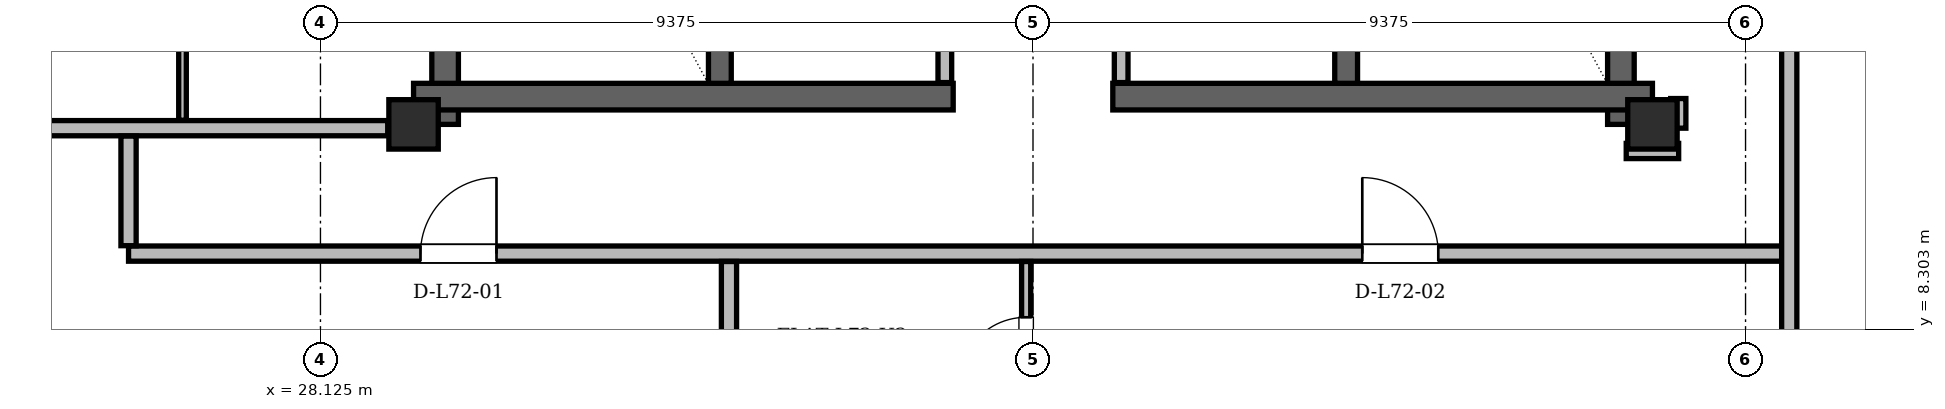
"""IFC4 building model, lengths in metres.
Left out: names, types, materials, properties, quantities, classifications, styles, units other than length and angle.
Written with IfcOpenShell. Run it as: python <this file> out.ifc"""

import sys

from ifc_helpers import new_model, si_unit, direction, frame, frame_2d, origin, origin_2d, place, context, subcontext, project, spatial, rectangle, hollow_rectangle, extrude, element, fill, save


model = new_model("IFC4")
c1 = context("Model", 3, precision=1e-05, world=origin(), true_north=direction((0.0, 1.0)))
c2 = subcontext(c1, "Body", "Model", "MODEL_VIEW")
j1 = project(units=[si_unit("LENGTHUNIT", "METRE"), si_unit("PLANEANGLEUNIT", "RADIAN")], contexts=[c1])
p1 = place(None, origin())
s1 = spatial("IfcSite", under=j1, at=p1, CompositionType="ELEMENT")
p2 = place(p1, origin())
s2 = spatial("IfcBuilding", under=s1, at=p2, CompositionType="ELEMENT")
p3 = place(p2, frame((0.0, 0.0, 273.3)))
s3 = spatial("IfcBuildingStorey", under=s2, at=p3, CompositionType="ELEMENT", Elevation=273.3)
for number, where, z_axis, x_axis in (
    (1, (29.35, 11.0, 0.0), (0.0, 0.0, 1.0), (1.0, 0.0, 0.0)),
    (2, (45.65, 11.0, 0.0), (0.0, 0.0, 1.0), (1.0, 0.0, 0.0)),
):
    element("IfcColumn", number, at=place(p3, frame(where, z_axis=z_axis, x_axis=x_axis)), inside=s3, PredefinedType="COLUMN", context=c2, shape_type="SweptSolid", body=[
        extrude(hollow_rectangle(XDim=0.65, YDim=0.65, WallThickness=0.05, at=origin_2d()), origin(), (0.0, 0.0, 1.0), 3.9),
    ])
for number, where, z_axis, x_axis in (
    (3, (29.765, 11.0, 0.0), (0.0, 0.0, 1.0), (0.0, 1.0, 0.0)),
    (4, (45.235, 11.0, 0.0), (0.0, 0.0, 1.0), (0.0, 1.0, 0.0)),
):
    element("IfcWall", number, at=place(p3, frame(where, z_axis=z_axis, x_axis=x_axis)), inside=s3, PredefinedType="SHEAR", context=c2, shape_type="SweptSolid", body=[
        extrude(rectangle(XDim=13.3, YDim=0.35, at=frame_2d((6.65, 0.0))), origin(), (0.0, 0.0, 1.0), 3.68),
    ])
for number, where, z_axis, x_axis in (
    (5, (29.35, 11.365, 0.0), (0.0, 0.0, 1.0), (1.0, 0.0, 0.0)),
    (6, (38.55, 11.365, 0.0), (0.0, 0.0, 1.0), (1.0, 0.0, 0.0)),
):
    element("IfcWall", number, at=place(p3, frame(where, z_axis=z_axis, x_axis=x_axis)), inside=s3, PredefinedType="SHEAR", context=c2, shape_type="SweptSolid", body=[
        extrude(rectangle(XDim=7.1, YDim=0.35, at=frame_2d((3.55, 0.0))), origin(), (0.0, 0.0, 1.0), 3.68),
    ])
for number, where, z_axis, x_axis in (
    (7, (33.38, 11.54, 0.0), (0.0, 0.0, 1.0), (0.0, 1.0, 0.0)),
    (8, (41.62, 11.54, 0.0), (0.0, 0.0, 1.0), (0.0, 1.0, 0.0)),
):
    element("IfcWall", number, at=place(p3, frame(where, z_axis=z_axis, x_axis=x_axis)), inside=s3, PredefinedType="SHEAR", context=c2, shape_type="SweptSolid", body=[
        extrude(rectangle(XDim=7.62, YDim=0.3, at=frame_2d((3.81, 0.0))), origin(), (0.0, 0.0, 1.0), 3.68),
    ])
p4 = place(p3, frame((58.532, 10.683, 0.0), z_axis=(0.0, 0.0, 1.0), x_axis=(-0.499999381892, 0.866025760649, 0.0)))
e9 = element("IfcWall", 9, at=p4, inside=s3, PredefinedType="SOLIDWALL", context=c2, shape_type="SweptSolid", body=[
    extrude(rectangle(XDim=37.343, YDim=0.29, at=frame_2d((18.671, 0.0))), origin(), (0.0, 0.0, 1.0), 3.058),
])
p5 = place(p4, frame((6.789, 0.0, 0.0)))
e10 = element("IfcOpeningElement", 10, at=p5, cuts=e9, PredefinedType="OPENING", context=c2, shape_type="SweptSolid", body=[
    extrude(rectangle(XDim=1.5, YDim=2.2, at=frame_2d((0.75, 1.1))), frame((0.0, 0.145, 0.0), z_axis=(0.0, -1.0, 0.0), x_axis=(1.0, 0.0, 0.0)), (0.0, 0.0, 1.0), 0.29),
])
p6 = place(p4, frame((27.808, 0.0, 0.0)))
e11 = element("IfcOpeningElement", 11, at=p6, cuts=e9, PredefinedType="OPENING", context=c2, shape_type="SweptSolid", body=[
    extrude(rectangle(XDim=1.5, YDim=2.2, at=frame_2d((0.75, 1.1))), frame((0.0, 0.145, 0.0), z_axis=(0.0, -1.0, 0.0), x_axis=(1.0, 0.0, 0.0)), (0.0, 0.0, 1.0), 0.29),
])
p7 = place(p4, frame((0.901, 0.0, 0.85)))
e12 = element("IfcOpeningElement", 12, at=p7, cuts=e9, PredefinedType="OPENING", context=c2, shape_type="SweptSolid", body=[
    extrude(rectangle(XDim=1.2, YDim=1.48, at=frame_2d((0.6, 0.74))), frame((0.0, 0.145, 0.0), z_axis=(0.0, -1.0, 0.0), x_axis=(1.0, 0.0, 0.0)), (0.0, 0.0, 1.0), 0.29),
])
p8 = place(p4, frame((12.688, 0.0, 0.85)))
e13 = element("IfcOpeningElement", 13, at=p8, cuts=e9, PredefinedType="OPENING", context=c2, shape_type="SweptSolid", body=[
    extrude(rectangle(XDim=3.0, YDim=2.098, at=frame_2d((1.5, 1.049))), frame((0.0, 0.145, 0.0), z_axis=(0.0, -1.0, 0.0), x_axis=(1.0, 0.0, 0.0)), (0.0, 0.0, 1.0), 0.29),
])
p9 = place(p4, frame((17.814, 0.0, 0.85)))
e14 = element("IfcOpeningElement", 14, at=p9, cuts=e9, PredefinedType="OPENING", context=c2, shape_type="SweptSolid", body=[
    extrude(rectangle(XDim=2.6, YDim=1.95, at=frame_2d((1.3, 0.975))), frame((0.0, 0.145, 0.0), z_axis=(0.0, -1.0, 0.0), x_axis=(1.0, 0.0, 0.0)), (0.0, 0.0, 1.0), 0.29),
])
p10 = place(p4, frame((35.362, 0.0, 0.85)))
e15 = element("IfcOpeningElement", 15, at=p10, cuts=e9, PredefinedType="OPENING", context=c2, shape_type="SweptSolid", body=[
    extrude(rectangle(XDim=1.2, YDim=1.48, at=frame_2d((0.6, 0.74))), frame((0.0, 0.145, 0.0), z_axis=(0.0, -1.0, 0.0), x_axis=(1.0, 0.0, 0.0)), (0.0, 0.0, 1.0), 0.29),
])
p11 = place(p4, frame((33.788, 0.0, 0.85)))
e16 = element("IfcOpeningElement", 16, at=p11, cuts=e9, PredefinedType="OPENING", context=c2, shape_type="SweptSolid", body=[
    extrude(rectangle(XDim=1.2, YDim=1.48, at=frame_2d((0.6, 0.74))), frame((0.0, 0.145, 0.0), z_axis=(0.0, -1.0, 0.0), x_axis=(1.0, 0.0, 0.0)), (0.0, 0.0, 1.0), 0.29),
])
p12 = place(p4, frame((22.74, 0.0, 0.85)))
e17 = element("IfcOpeningElement", 17, at=p12, cuts=e9, PredefinedType="OPENING", context=c2, shape_type="SweptSolid", body=[
    extrude(rectangle(XDim=1.2, YDim=1.48, at=frame_2d((0.6, 0.74))), frame((0.0, 0.145, 0.0), z_axis=(0.0, -1.0, 0.0), x_axis=(1.0, 0.0, 0.0)), (0.0, 0.0, 1.0), 0.29),
])
p13 = place(p4, frame((31.705, 0.0, 0.85)))
e18 = element("IfcOpeningElement", 18, at=p13, cuts=e9, PredefinedType="OPENING", context=c2, shape_type="SweptSolid", body=[
    extrude(rectangle(XDim=1.2, YDim=1.48, at=frame_2d((0.6, 0.74))), frame((0.0, 0.145, 0.0), z_axis=(0.0, -1.0, 0.0), x_axis=(1.0, 0.0, 0.0)), (0.0, 0.0, 1.0), 0.29),
])
p14 = place(p3, frame((35.139, 43.023, 0.0), z_axis=(0.0, 0.0, 1.0), x_axis=(-0.499999381892, -0.866025760649, 0.0)))
e19 = element("IfcWall", 19, at=p14, inside=s3, PredefinedType="SOLIDWALL", context=c2, shape_type="SweptSolid", body=[
    extrude(rectangle(XDim=37.343, YDim=0.29, at=frame_2d((18.671, 0.0))), origin(), (0.0, 0.0, 1.0), 3.058),
])
p15 = place(p14, frame((3.639, 0.0, 0.0)))
e20 = element("IfcOpeningElement", 20, at=p15, cuts=e19, PredefinedType="OPENING", context=c2, shape_type="SweptSolid", body=[
    extrude(rectangle(XDim=1.5, YDim=2.2, at=frame_2d((0.75, 1.1))), frame((0.0, 0.145, 0.0), z_axis=(0.0, -1.0, 0.0), x_axis=(1.0, 0.0, 0.0)), (0.0, 0.0, 1.0), 0.29),
])
p16 = place(p14, frame((27.809, 0.0, 0.0)))
e21 = element("IfcOpeningElement", 21, at=p16, cuts=e19, PredefinedType="OPENING", context=c2, shape_type="SweptSolid", body=[
    extrude(rectangle(XDim=1.5, YDim=2.2, at=frame_2d((0.75, 1.1))), frame((0.0, 0.145, 0.0), z_axis=(0.0, -1.0, 0.0), x_axis=(1.0, 0.0, 0.0)), (0.0, 0.0, 1.0), 0.29),
])
p17 = place(p14, frame((22.281, 0.0, 0.85)))
e22 = element("IfcOpeningElement", 22, at=p17, cuts=e19, PredefinedType="OPENING", context=c2, shape_type="SweptSolid", body=[
    extrude(rectangle(XDim=2.6, YDim=1.95, at=frame_2d((1.3, 0.975))), frame((0.0, 0.145, 0.0), z_axis=(0.0, -1.0, 0.0), x_axis=(1.0, 0.0, 0.0)), (0.0, 0.0, 1.0), 0.29),
])
p18 = place(p14, frame((33.866, 0.0, 0.85)))
e23 = element("IfcOpeningElement", 23, at=p18, cuts=e19, PredefinedType="OPENING", context=c2, shape_type="SweptSolid", body=[
    extrude(rectangle(XDim=2.4, YDim=1.9, at=frame_2d((1.2, 0.95))), frame((0.0, 0.145, 0.0), z_axis=(0.0, -1.0, 0.0), x_axis=(1.0, 0.0, 0.0)), (0.0, 0.0, 1.0), 0.29),
])
p19 = place(p14, frame((12.197, 0.0, 0.85)))
e24 = element("IfcOpeningElement", 24, at=p19, cuts=e19, PredefinedType="OPENING", context=c2, shape_type="SweptSolid", body=[
    extrude(rectangle(XDim=1.2, YDim=1.48, at=frame_2d((0.6, 0.74))), frame((0.0, 0.145, 0.0), z_axis=(0.0, -1.0, 0.0), x_axis=(1.0, 0.0, 0.0)), (0.0, 0.0, 1.0), 0.29),
])
p20 = place(p14, frame((16.635, 0.0, 0.85)))
e25 = element("IfcOpeningElement", 25, at=p20, cuts=e19, PredefinedType="OPENING", context=c2, shape_type="SweptSolid", body=[
    extrude(rectangle(XDim=1.6, YDim=1.7, at=frame_2d((0.8, 0.85))), frame((0.0, 0.145, 0.0), z_axis=(0.0, -1.0, 0.0), x_axis=(1.0, 0.0, 0.0)), (0.0, 0.0, 1.0), 0.29),
])
p21 = place(p14, frame((7.001, 0.0, 0.85)))
e26 = element("IfcOpeningElement", 26, at=p21, cuts=e19, PredefinedType="OPENING", context=c2, shape_type="SweptSolid", body=[
    extrude(rectangle(XDim=1.2, YDim=1.48, at=frame_2d((0.6, 0.74))), frame((0.0, 0.145, 0.0), z_axis=(0.0, -1.0, 0.0), x_axis=(1.0, 0.0, 0.0)), (0.0, 0.0, 1.0), 0.29),
])
p22 = place(p3, frame((36.34, 11.55, 0.0), z_axis=(0.0, 0.0, 1.0), x_axis=(0.0, 1.0, 0.0)))
e27 = element("IfcWall", 27, at=p22, inside=s3, PredefinedType="PARTITIONING", context=c2, shape_type="SweptSolid", body=[
    extrude(rectangle(XDim=5.55, YDim=0.18, at=frame_2d((2.775, 0.0))), origin(), (0.0, 0.0, 1.0), 3.68),
])
p23 = place(p22, frame((0.55, 0.0, 0.0)))
e28 = element("IfcOpeningElement", 28, at=p23, cuts=e27, PredefinedType="OPENING", context=c2, shape_type="SweptSolid", body=[
    extrude(rectangle(XDim=0.88, YDim=2.08, at=frame_2d((0.44, 1.04))), frame((0.0, 0.09, 0.0), z_axis=(0.0, -1.0, 0.0), x_axis=(1.0, 0.0, 0.0)), (0.0, 0.0, 1.0), 0.18),
])
p24 = place(p22, frame((3.25, 0.0, 0.0)))
e29 = element("IfcOpeningElement", 29, at=p24, cuts=e27, PredefinedType="OPENING", context=c2, shape_type="SweptSolid", body=[
    extrude(rectangle(XDim=0.88, YDim=2.08, at=frame_2d((0.44, 1.04))), frame((0.0, 0.09, 0.0), z_axis=(0.0, -1.0, 0.0), x_axis=(1.0, 0.0, 0.0)), (0.0, 0.0, 1.0), 0.18),
])
p25 = place(p3, frame((38.66, 11.55, 0.0), z_axis=(0.0, 0.0, 1.0), x_axis=(0.0, 1.0, 0.0)))
e30 = element("IfcWall", 30, at=p25, inside=s3, PredefinedType="PARTITIONING", context=c2, shape_type="SweptSolid", body=[
    extrude(rectangle(XDim=5.55, YDim=0.18, at=frame_2d((2.775, 0.0))), origin(), (0.0, 0.0, 1.0), 3.68),
])
p26 = place(p25, frame((1.35, 0.0, 0.0)))
e31 = element("IfcOpeningElement", 31, at=p26, cuts=e30, PredefinedType="OPENING", context=c2, shape_type="SweptSolid", body=[
    extrude(rectangle(XDim=0.88, YDim=2.08, at=frame_2d((0.44, 1.04))), frame((0.0, 0.09, 0.0), z_axis=(0.0, -1.0, 0.0), x_axis=(1.0, 0.0, 0.0)), (0.0, 0.0, 1.0), 0.18),
])
p27 = place(p25, frame((4.1, 0.0, 0.0)))
e32 = element("IfcOpeningElement", 32, at=p27, cuts=e30, PredefinedType="OPENING", context=c2, shape_type="SweptSolid", body=[
    extrude(rectangle(XDim=0.88, YDim=2.08, at=frame_2d((0.44, 1.04))), frame((0.0, 0.09, 0.0), z_axis=(0.0, -1.0, 0.0), x_axis=(1.0, 0.0, 0.0)), (0.0, 0.0, 1.0), 0.18),
])
p28 = place(p3, frame((25.6, 9.3, 0.0), z_axis=(0.0, 0.0, 1.0), x_axis=(1.0, 0.0, 0.0)))
e33 = element("IfcWall", 33, at=p28, inside=s3, PredefinedType="PARTITIONING", context=c2, shape_type="SweptSolid", body=[
    extrude(rectangle(XDim=21.85, YDim=0.2, at=frame_2d((10.925, 0.0))), origin(), (0.0, 0.0, 1.0), 3.68),
])
p29 = place(p28, frame((3.841, 0.0, 0.0)))
e34 = element("IfcOpeningElement", 34, at=p29, cuts=e33, PredefinedType="OPENING", context=c2, shape_type="SweptSolid", body=[
    extrude(rectangle(XDim=1.0, YDim=2.18, at=frame_2d((0.5, 1.09))), frame((0.0, 0.1, 0.0), z_axis=(0.0, -1.0, 0.0), x_axis=(1.0, 0.0, 0.0)), (0.0, 0.0, 1.0), 0.2),
])
p30 = place(p28, frame((16.232, 0.0, 0.0)))
e35 = element("IfcOpeningElement", 35, at=p30, cuts=e33, PredefinedType="OPENING", context=c2, shape_type="SweptSolid", body=[
    extrude(rectangle(XDim=1.0, YDim=2.18, at=frame_2d((0.5, 1.09))), frame((0.0, 0.1, 0.0), z_axis=(0.0, -1.0, 0.0), x_axis=(1.0, 0.0, 0.0)), (0.0, 0.0, 1.0), 0.2),
])
p31 = place(p3, frame((45.305, 10.65, 0.0), z_axis=(0.0, 0.0, 1.0), x_axis=(1.0, 0.0, 0.0)))
e36 = element("IfcWall", 36, at=p31, inside=s3, PredefinedType="PARTITIONING", context=c2, shape_type="SweptSolid", body=[
    extrude(rectangle(XDim=0.69, YDim=0.2, at=frame_2d((0.345, 0.0))), origin(), (0.0, 0.0, 1.0), 3.68),
])
p32 = place(p3, frame((16.803, 10.95, 0.0), z_axis=(0.0, 0.0, 1.0), x_axis=(1.0, 0.0, 0.0)))
e37 = element("IfcWall", 37, at=p32, inside=s3, PredefinedType="PARTITIONING", context=c2, shape_type="SweptSolid", body=[
    extrude(rectangle(XDim=12.207, YDim=0.2, at=frame_2d((6.104, 0.0))), origin(), (0.0, 0.0, 1.0), 3.266),
])
p33 = place(p3, frame((25.6, 9.404, 0.0), z_axis=(0.0, 0.0, 1.0), x_axis=(0.0, 1.0, 0.0)))
e38 = element("IfcWall", 38, at=p33, inside=s3, PredefinedType="PARTITIONING", context=c2, shape_type="SweptSolid", body=[
    extrude(rectangle(XDim=1.442, YDim=0.2, at=frame_2d((0.721, 0.0))), origin(), (0.0, 0.0, 1.0), 3.266),
])
p34 = place(p3, frame((26.31, 11.054, 0.0), z_axis=(0.0, 0.0, 1.0), x_axis=(0.0, 1.0, 0.0)))
e39 = element("IfcWall", 39, at=p34, inside=s3, PredefinedType="PARTITIONING", context=c2, shape_type="SweptSolid", body=[
    extrude(rectangle(XDim=2.762, YDim=0.1, at=frame_2d((1.381, 0.0))), origin(), (0.0, 0.0, 1.0), 3.68),
])
p35 = place(p3, frame((33.5, 6.743, 0.0), z_axis=(0.0, 0.0, 1.0), x_axis=(0.0, 1.0, 0.0)))
e40 = element("IfcWall", 40, at=p35, inside=s3, PredefinedType="PARTITIONING", context=c2, shape_type="SweptSolid", body=[
    extrude(rectangle(XDim=2.453, YDim=0.2, at=frame_2d((1.227, 0.0))), origin(), (0.0, 0.0, 1.0), 3.68),
])
p36 = place(p3, frame((37.41, 6.743, 0.0), z_axis=(0.0, 0.0, 1.0), x_axis=(0.0, 1.0, 0.0)))
e41 = element("IfcWall", 41, at=p36, inside=s3, PredefinedType="PARTITIONING", context=c2, shape_type="SweptSolid", body=[
    extrude(rectangle(XDim=2.453, YDim=0.12, at=frame_2d((1.227, 0.0))), origin(), (0.0, 0.0, 1.0), 3.68),
])
p37 = place(p36, frame((0.839, 0.0, 0.0)))
e42 = element("IfcOpeningElement", 42, at=p37, cuts=e41, PredefinedType="OPENING", context=c2, shape_type="SweptSolid", body=[
    extrude(rectangle(XDim=0.88, YDim=2.08, at=frame_2d((0.44, 1.04))), frame((0.0, 0.06, 0.0), z_axis=(0.0, -1.0, 0.0), x_axis=(1.0, 0.0, 0.0)), (0.0, 0.0, 1.0), 0.12),
])
p38 = place(p3, frame((45.99, 10.95, 0.0), z_axis=(0.0, 0.0, 1.0), x_axis=(0.0, 1.0, 0.0)))
e43 = element("IfcWall", 43, at=p38, inside=s3, PredefinedType="PARTITIONING", context=c2, shape_type="SweptSolid", body=[
    extrude(rectangle(XDim=0.39, YDim=0.2, at=frame_2d((0.195, 0.0))), origin(), (0.0, 0.0, 1.0), 3.68),
])
p39 = place(p3, frame((47.45, 6.743, 0.0), z_axis=(0.0, 0.0, 1.0), x_axis=(0.0, 1.0, 0.0)))
e44 = element("IfcWall", 44, at=p39, inside=s3, PredefinedType="PARTITIONING", context=c2, shape_type="SweptSolid", body=[
    extrude(rectangle(XDim=22.837, YDim=0.2, at=frame_2d((11.418, 0.0))), origin(), (0.0, 0.0, 1.0), 3.058),
])
p40 = place(p39, frame((7.153, 0.0, 0.0)))
e45 = element("IfcOpeningElement", 45, at=p40, cuts=e44, PredefinedType="OPENING", context=c2, shape_type="SweptSolid", body=[
    extrude(rectangle(XDim=1.0, YDim=2.18, at=frame_2d((0.5, 1.09))), frame((0.0, 0.1, 0.0), z_axis=(0.0, -1.0, 0.0), x_axis=(1.0, 0.0, 0.0)), (0.0, 0.0, 1.0), 0.2),
])
p41 = place(p39, frame((15.139, 0.0, 0.0)))
e46 = element("IfcOpeningElement", 46, at=p41, cuts=e44, PredefinedType="OPENING", context=c2, shape_type="SweptSolid", body=[
    extrude(rectangle(XDim=1.0, YDim=2.18, at=frame_2d((0.5, 1.09))), frame((0.0, 0.1, 0.0), z_axis=(0.0, -1.0, 0.0), x_axis=(1.0, 0.0, 0.0)), (0.0, 0.0, 1.0), 0.2),
])
p42 = place(p29, origin())
e47 = element("IfcDoor", 47, at=p42, inside=s3, OperationType="SINGLE_SWING_RIGHT", PredefinedType="DOOR", context=c2, shape_type="SweptSolid", body=[
    extrude(rectangle(XDim=1.0, YDim=2.18, at=frame_2d((0.5, 1.09))), frame((0.0, 0.025, 0.0), z_axis=(0.0, -1.0, 0.0), x_axis=(1.0, 0.0, 0.0)), (0.0, 0.0, 1.0), 0.05),
])
fill(e34, e47)
p43 = place(p30, origin())
e48 = element("IfcDoor", 48, at=p43, inside=s3, OperationType="SINGLE_SWING_LEFT", PredefinedType="DOOR", context=c2, shape_type="SweptSolid", body=[
    extrude(rectangle(XDim=1.0, YDim=2.18, at=frame_2d((0.5, 1.09))), frame((0.0, 0.025, 0.0), z_axis=(0.0, -1.0, 0.0), x_axis=(1.0, 0.0, 0.0)), (0.0, 0.0, 1.0), 0.05),
])
fill(e35, e48)
p44 = place(p37, origin())
e49 = element("IfcDoor", 49, at=p44, inside=s3, OperationType="SINGLE_SWING_LEFT", PredefinedType="DOOR", context=c2, shape_type="SweptSolid", body=[
    extrude(rectangle(XDim=0.88, YDim=2.08, at=frame_2d((0.44, 1.04))), frame((0.0, 0.025, 0.0), z_axis=(0.0, -1.0, 0.0), x_axis=(1.0, 0.0, 0.0)), (0.0, 0.0, 1.0), 0.05),
])
fill(e42, e49)
save(model, sys.argv[1])
